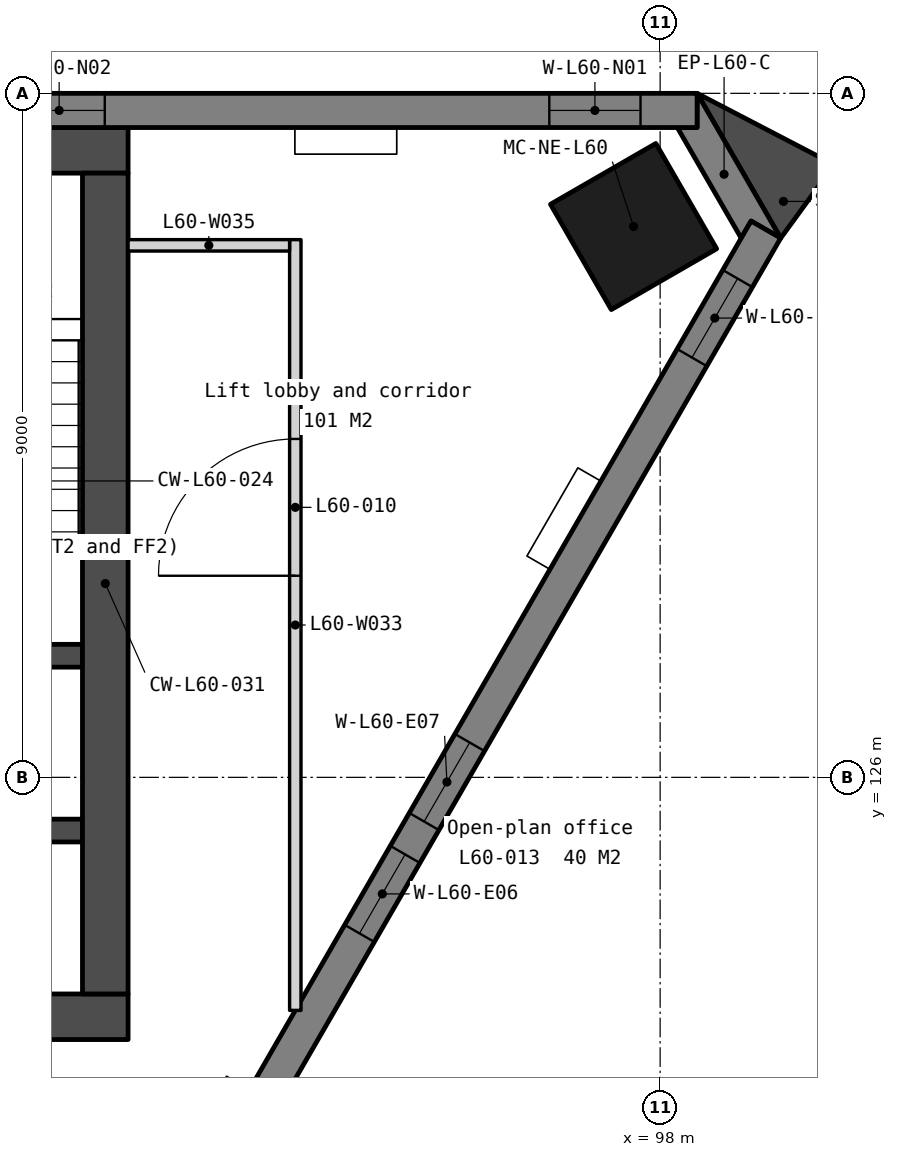
"""IFC4 building model, lengths in metres.
Left out: names, types, materials, properties, quantities, classifications, styles, units other than length and angle.
Written with IfcOpenShell. Run it as: python <this file> out.ifc"""

import sys

from ifc_helpers import new_model, si_unit, direction, frame, frame_2d, origin, origin_2d, place, context, subcontext, project, spatial, polyline, rectangle, outline, extrude, element, fill, save


model = new_model("IFC4")
c1 = context("Model", 3, precision=1e-05, world=origin(), true_north=direction((0.0, 1.0)))
c2 = subcontext(c1, "Body", "Model", "MODEL_VIEW")
j1 = project(units=[si_unit("LENGTHUNIT", "METRE"), si_unit("PLANEANGLEUNIT", "RADIAN")], contexts=[c1])
p1 = place(None, origin())
s1 = spatial("IfcSite", under=j1, at=p1, CompositionType="ELEMENT")
p2 = place(p1, origin())
s2 = spatial("IfcBuilding", under=s1, at=p2, CompositionType="ELEMENT")
p3 = place(p2, frame((0.0, 0.0, 246.5)))
s3 = spatial("IfcBuildingStorey", under=s2, at=p3, CompositionType="ELEMENT", Elevation=246.5)
p4 = place(p3, frame((97.651, 133.247, 0.0), z_axis=(0.0, 0.0, 1.0), x_axis=(-0.5, 0.866025403784, 0.0)))
e1 = element("IfcColumn", 1, at=p4, inside=s3, PredefinedType="COLUMN", context=c2, shape_type="SweptSolid", body=[
    extrude(rectangle(XDim=1.6, YDim=1.6, at=origin_2d()), origin(), (0.0, 0.0, 1.0), 3.9),
])
p5 = place(p3, frame((69.0, 134.25, 0.0), z_axis=(0.0, 0.0, 1.0), x_axis=(1.0, 0.0, 0.0)))
e2 = element("IfcWall", 2, at=p5, inside=s3, PredefinedType="SOLIDWALL", context=c2, shape_type="SweptSolid", body=[
    extrude(rectangle(XDim=22.0, YDim=0.6, at=frame_2d((11.0, 0.0))), origin(), (0.0, 0.0, 1.0), 3.75),
])
p6 = place(p3, frame((69.0, 122.85, 0.0), z_axis=(0.0, 0.0, 1.0), x_axis=(1.0, 0.0, 0.0)))
e3 = element("IfcWall", 3, at=p6, inside=s3, PredefinedType="SOLIDWALL", context=c2, shape_type="SweptSolid", body=[
    extrude(rectangle(XDim=22.0, YDim=0.6, at=frame_2d((11.0, 0.0))), origin(), (0.0, 0.0, 1.0), 3.75),
])
p7 = place(p6, frame((16.375, 0.0, 0.0)))
e4 = element("IfcOpeningElement", 4, at=p7, cuts=e3, PredefinedType="OPENING", context=c2, shape_type="SweptSolid", body=[
    extrude(rectangle(XDim=1.8, YDim=2.1, at=frame_2d((0.9, 1.05))), frame((0.0, 0.31, 0.0), z_axis=(0.0, -1.0, 0.0), x_axis=(1.0, 0.0, 0.0)), (0.0, 0.0, 1.0), 0.62),
])
p8 = place(p6, frame((3.825, 0.0, 0.0)))
e5 = element("IfcOpeningElement", 5, at=p8, cuts=e3, PredefinedType="OPENING", context=c2, shape_type="SweptSolid", body=[
    extrude(rectangle(XDim=1.8, YDim=2.1, at=frame_2d((0.9, 1.05))), frame((0.0, 0.31, 0.0), z_axis=(0.0, -1.0, 0.0), x_axis=(1.0, 0.0, 0.0)), (0.0, 0.0, 1.0), 0.62),
])
p9 = place(p6, frame((12.85, 0.0, 0.0)))
e6 = element("IfcOpeningElement", 6, at=p9, cuts=e3, PredefinedType="OPENING", context=c2, shape_type="SweptSolid", body=[
    extrude(rectangle(XDim=1.5, YDim=2.1, at=frame_2d((0.75, 1.05))), frame((0.0, 0.31, 0.0), z_axis=(0.0, -1.0, 0.0), x_axis=(1.0, 0.0, 0.0)), (0.0, 0.0, 1.0), 0.62),
])
for number, where, z_axis, x_axis in (
    (7, (87.85, 127.6, 0.0), (0.0, 0.0, 1.0), (1.0, 0.0, 0.0)),
    (8, (87.85, 125.3, 0.0), (0.0, 0.0, 1.0), (1.0, 0.0, 0.0)),
):
    element("IfcWall", number, at=place(p3, frame(where, z_axis=z_axis, x_axis=x_axis)), inside=s3, PredefinedType="SOLIDWALL", context=c2, shape_type="SweptSolid", body=[
        extrude(rectangle(XDim=2.55, YDim=0.3, at=frame_2d((1.275, 0.0))), origin(), (0.0, 0.0, 1.0), 3.75),
    ])
p10 = place(p3, frame((90.7, 133.95, 0.0), z_axis=(0.0, 0.0, 1.0), x_axis=(0.0, -1.0, 0.0)))
e9 = element("IfcWall", 9, at=p10, inside=s3, PredefinedType="SOLIDWALL", context=c2, shape_type="SweptSolid", body=[
    extrude(rectangle(XDim=10.8, YDim=0.6, at=frame_2d((5.4, 0.0))), origin(), (0.0, 0.0, 1.0), 3.75),
])
p11 = place(p3, frame((0.0, 0.0, -0.15)))
e10 = element("IfcWall", 10, at=p11, inside=s3, PredefinedType="SOLIDWALL", context=c2, shape_type="SweptSolid", body=[
    extrude(outline(polyline([(99.586, 133.095), (99.197, 133.32), (99.067, 133.095), (98.226, 134.55), (98.486, 134.55), (98.486, 135.0), (99.586, 133.095)])), origin(), (0.0, 0.0, 1.0), 3.9),
])
p12 = place(p3, frame((98.486, 134.775, -0.15), z_axis=(0.0, 0.0, 1.0), x_axis=(-1.0, 0.0, 0.0)))
e11 = element("IfcWall", 11, at=p12, inside=s3, PredefinedType="SOLIDWALL", context=c2, shape_type="SweptSolid", body=[
    extrude(outline(polyline([(36.972, 0.0), (36.972, 3.9), (0.0, 3.9), (0.0, 0.0), (36.972, 0.0)])), frame((0.0, 0.225, 0.0), z_axis=(0.0, -1.0, 0.0), x_axis=(1.0, 0.0, 0.0)), (0.0, 0.0, 1.0), 0.45),
])
p13 = place(p12, frame((0.744, 0.0, 0.95)))
e12 = element("IfcOpeningElement", 12, at=p13, cuts=e11, PredefinedType="OPENING", context=c2, shape_type="SweptSolid", body=[
    extrude(rectangle(XDim=1.2, YDim=2.2, at=frame_2d((0.6, 1.1))), frame((0.0, 0.235, 0.0), z_axis=(0.0, -1.0, 0.0), x_axis=(1.0, 0.0, 0.0)), (0.0, 0.0, 1.0), 0.47),
])
p14 = place(p12, frame((7.793, 0.0, 0.95)))
e13 = element("IfcOpeningElement", 13, at=p14, cuts=e11, PredefinedType="OPENING", context=c2, shape_type="SweptSolid", body=[
    extrude(rectangle(XDim=1.2, YDim=2.2, at=frame_2d((0.6, 1.1))), frame((0.0, 0.235, 0.0), z_axis=(0.0, -1.0, 0.0), x_axis=(1.0, 0.0, 0.0)), (0.0, 0.0, 1.0), 0.47),
])
p15 = place(p12, frame((9.493, 0.0, 0.95)))
e14 = element("IfcOpeningElement", 14, at=p15, cuts=e11, PredefinedType="OPENING", context=c2, shape_type="SweptSolid", body=[
    extrude(rectangle(XDim=1.2, YDim=2.2, at=frame_2d((0.6, 1.1))), frame((0.0, 0.235, 0.0), z_axis=(0.0, -1.0, 0.0), x_axis=(1.0, 0.0, 0.0)), (0.0, 0.0, 1.0), 0.47),
])
p16 = place(p12, frame((17.036, 0.0, 0.95)))
e15 = element("IfcOpeningElement", 15, at=p16, cuts=e11, PredefinedType="OPENING", context=c2, shape_type="SweptSolid", body=[
    extrude(rectangle(XDim=1.2, YDim=2.2, at=frame_2d((0.6, 1.1))), frame((0.0, 0.235, 0.0), z_axis=(0.0, -1.0, 0.0), x_axis=(1.0, 0.0, 0.0)), (0.0, 0.0, 1.0), 0.47),
])
p17 = place(p12, frame((18.736, 0.0, 0.95)))
e16 = element("IfcOpeningElement", 16, at=p17, cuts=e11, PredefinedType="OPENING", context=c2, shape_type="SweptSolid", body=[
    extrude(rectangle(XDim=1.2, YDim=2.2, at=frame_2d((0.6, 1.1))), frame((0.0, 0.235, 0.0), z_axis=(0.0, -1.0, 0.0), x_axis=(1.0, 0.0, 0.0)), (0.0, 0.0, 1.0), 0.47),
])
p18 = place(p12, frame((26.279, 0.0, 0.95)))
e17 = element("IfcOpeningElement", 17, at=p18, cuts=e11, PredefinedType="OPENING", context=c2, shape_type="SweptSolid", body=[
    extrude(rectangle(XDim=1.2, YDim=2.2, at=frame_2d((0.6, 1.1))), frame((0.0, 0.235, 0.0), z_axis=(0.0, -1.0, 0.0), x_axis=(1.0, 0.0, 0.0)), (0.0, 0.0, 1.0), 0.47),
])
p19 = place(p12, frame((27.979, 0.0, 0.95)))
e18 = element("IfcOpeningElement", 18, at=p19, cuts=e11, PredefinedType="OPENING", context=c2, shape_type="SweptSolid", body=[
    extrude(rectangle(XDim=1.2, YDim=2.2, at=frame_2d((0.6, 1.1))), frame((0.0, 0.235, 0.0), z_axis=(0.0, -1.0, 0.0), x_axis=(1.0, 0.0, 0.0)), (0.0, 0.0, 1.0), 0.47),
])
p20 = place(p12, frame((35.028, 0.0, 0.95)))
e19 = element("IfcOpeningElement", 19, at=p20, cuts=e11, PredefinedType="OPENING", context=c2, shape_type="SweptSolid", body=[
    extrude(rectangle(XDim=1.2, YDim=2.2, at=frame_2d((0.6, 1.1))), frame((0.0, 0.235, 0.0), z_axis=(0.0, -1.0, 0.0), x_axis=(1.0, 0.0, 0.0)), (0.0, 0.0, 1.0), 0.47),
])
p21 = place(p3, frame((80.905, 101.188, -0.15), z_axis=(0.0, 0.0, 1.0), x_axis=(0.500002536638, 0.866023939251, 0.0)))
e20 = element("IfcWall", 20, at=p21, inside=s3, PredefinedType="SOLIDWALL", context=c2, shape_type="SweptSolid", body=[
    extrude(outline(polyline([(36.972, 0.0), (36.972, 3.9), (0.0, 3.9), (0.0, 0.0), (36.972, 0.0)])), frame((0.0, 0.225, 0.0), z_axis=(0.0, -1.0, 0.0), x_axis=(1.0, 0.0, 0.0)), (0.0, 0.0, 1.0), 0.45),
])
p22 = place(p21, frame((0.744, 0.0, 0.95)))
e21 = element("IfcOpeningElement", 21, at=p22, cuts=e20, PredefinedType="OPENING", context=c2, shape_type="SweptSolid", body=[
    extrude(rectangle(XDim=1.2, YDim=2.2, at=frame_2d((0.6, 1.1))), frame((0.0, 0.235, 0.0), z_axis=(0.0, -1.0, 0.0), x_axis=(1.0, 0.0, 0.0)), (0.0, 0.0, 1.0), 0.47),
])
p23 = place(p21, frame((7.793, 0.0, 0.95)))
e22 = element("IfcOpeningElement", 22, at=p23, cuts=e20, PredefinedType="OPENING", context=c2, shape_type="SweptSolid", body=[
    extrude(rectangle(XDim=1.2, YDim=2.2, at=frame_2d((0.6, 1.1))), frame((0.0, 0.235, 0.0), z_axis=(0.0, -1.0, 0.0), x_axis=(1.0, 0.0, 0.0)), (0.0, 0.0, 1.0), 0.47),
])
p24 = place(p21, frame((9.493, 0.0, 0.95)))
e23 = element("IfcOpeningElement", 23, at=p24, cuts=e20, PredefinedType="OPENING", context=c2, shape_type="SweptSolid", body=[
    extrude(rectangle(XDim=1.2, YDim=2.2, at=frame_2d((0.6, 1.1))), frame((0.0, 0.235, 0.0), z_axis=(0.0, -1.0, 0.0), x_axis=(1.0, 0.0, 0.0)), (0.0, 0.0, 1.0), 0.47),
])
p25 = place(p21, frame((17.036, 0.0, 0.95)))
e24 = element("IfcOpeningElement", 24, at=p25, cuts=e20, PredefinedType="OPENING", context=c2, shape_type="SweptSolid", body=[
    extrude(rectangle(XDim=1.2, YDim=2.2, at=frame_2d((0.6, 1.1))), frame((0.0, 0.235, 0.0), z_axis=(0.0, -1.0, 0.0), x_axis=(1.0, 0.0, 0.0)), (0.0, 0.0, 1.0), 0.47),
])
p26 = place(p21, frame((18.736, 0.0, 0.95)))
e25 = element("IfcOpeningElement", 25, at=p26, cuts=e20, PredefinedType="OPENING", context=c2, shape_type="SweptSolid", body=[
    extrude(rectangle(XDim=1.2, YDim=2.2, at=frame_2d((0.6, 1.1))), frame((0.0, 0.235, 0.0), z_axis=(0.0, -1.0, 0.0), x_axis=(1.0, 0.0, 0.0)), (0.0, 0.0, 1.0), 0.47),
])
p27 = place(p21, frame((26.279, 0.0, 0.95)))
e26 = element("IfcOpeningElement", 26, at=p27, cuts=e20, PredefinedType="OPENING", context=c2, shape_type="SweptSolid", body=[
    extrude(rectangle(XDim=1.2, YDim=2.2, at=frame_2d((0.6, 1.1))), frame((0.0, 0.235, 0.0), z_axis=(0.0, -1.0, 0.0), x_axis=(1.0, 0.0, 0.0)), (0.0, 0.0, 1.0), 0.47),
])
p28 = place(p21, frame((27.979, 0.0, 0.95)))
e27 = element("IfcOpeningElement", 27, at=p28, cuts=e20, PredefinedType="OPENING", context=c2, shape_type="SweptSolid", body=[
    extrude(rectangle(XDim=1.2, YDim=2.2, at=frame_2d((0.6, 1.1))), frame((0.0, 0.235, 0.0), z_axis=(0.0, -1.0, 0.0), x_axis=(1.0, 0.0, 0.0)), (0.0, 0.0, 1.0), 0.47),
])
p29 = place(p21, frame((35.028, 0.0, 0.95)))
e28 = element("IfcOpeningElement", 28, at=p29, cuts=e20, PredefinedType="OPENING", context=c2, shape_type="SweptSolid", body=[
    extrude(rectangle(XDim=1.2, YDim=2.2, at=frame_2d((0.6, 1.1))), frame((0.0, 0.235, 0.0), z_axis=(0.0, -1.0, 0.0), x_axis=(1.0, 0.0, 0.0)), (0.0, 0.0, 1.0), 0.47),
])
p30 = place(p3, frame((0.0, 0.0, -0.15)))
e29 = element("IfcWall", 29, at=p30, inside=s3, PredefinedType="SOLIDWALL", context=c2, shape_type="SweptSolid", body=[
    extrude(outline(polyline([(99.586, 133.095), (100.29, 134.061), (98.486, 135.0), (99.586, 133.095)])), origin(), (0.0, 0.0, 1.0), 3.9),
])
p31 = place(p3, frame((93.2, 122.934, 0.0), z_axis=(0.0, 0.0, 1.0), x_axis=(0.0, 1.0, 0.0)))
e30 = element("IfcWall", 30, at=p31, inside=s3, PredefinedType="PARTITIONING", context=c2, shape_type="SweptSolid", body=[
    extrude(rectangle(XDim=10.141, YDim=0.15, at=frame_2d((5.071, 0.0))), origin(), (0.0, 0.0, 1.0), 3.75),
])
p32 = place(p31, frame((5.719, 0.0, 0.0)))
e31 = element("IfcOpeningElement", 31, at=p32, cuts=e30, PredefinedType="OPENING", context=c2, shape_type="SweptSolid", body=[
    extrude(rectangle(XDim=1.8, YDim=2.1, at=frame_2d((0.9, 1.05))), frame((0.0, 0.085, 0.0), z_axis=(0.0, -1.0, 0.0), x_axis=(1.0, 0.0, 0.0)), (0.0, 0.0, 1.0), 0.17),
])
p33 = place(p3, frame((91.0, 133.0, 0.0), z_axis=(0.0, 0.0, 1.0), x_axis=(1.0, 0.0, 0.0)))
e32 = element("IfcWall", 32, at=p33, inside=s3, PredefinedType="PARTITIONING", context=c2, shape_type="SweptSolid", body=[
    extrude(rectangle(XDim=2.125, YDim=0.15, at=frame_2d((1.062, 0.0))), origin(), (0.0, 0.0, 1.0), 3.75),
])
p34 = place(p13, origin())
e33 = element("IfcWindow", 33, at=p34, inside=s3, PartitioningType="SINGLE_PANEL", PredefinedType="WINDOW", context=c2, shape_type="SweptSolid", body=[
    extrude(rectangle(XDim=1.2, YDim=2.2, at=frame_2d((0.6, 1.1))), frame((0.0, 0.03, 0.0), z_axis=(0.0, -1.0, 0.0), x_axis=(1.0, 0.0, 0.0)), (0.0, 0.0, 1.0), 0.06),
])
fill(e12, e33)
p35 = place(p14, origin())
e34 = element("IfcWindow", 34, at=p35, inside=s3, PartitioningType="SINGLE_PANEL", PredefinedType="WINDOW", context=c2, shape_type="SweptSolid", body=[
    extrude(rectangle(XDim=1.2, YDim=2.2, at=frame_2d((0.6, 1.1))), frame((0.0, 0.03, 0.0), z_axis=(0.0, -1.0, 0.0), x_axis=(1.0, 0.0, 0.0)), (0.0, 0.0, 1.0), 0.06),
])
fill(e13, e34)
p36 = place(p27, origin())
e35 = element("IfcWindow", 35, at=p36, inside=s3, PartitioningType="SINGLE_PANEL", PredefinedType="WINDOW", context=c2, shape_type="SweptSolid", body=[
    extrude(rectangle(XDim=1.2, YDim=2.2, at=frame_2d((0.6, 1.1))), frame((0.0, 0.03, 0.0), z_axis=(0.0, -1.0, 0.0), x_axis=(1.0, 0.0, 0.0)), (0.0, 0.0, 1.0), 0.06),
])
fill(e26, e35)
p37 = place(p28, origin())
e36 = element("IfcWindow", 36, at=p37, inside=s3, PartitioningType="SINGLE_PANEL", PredefinedType="WINDOW", context=c2, shape_type="SweptSolid", body=[
    extrude(rectangle(XDim=1.2, YDim=2.2, at=frame_2d((0.6, 1.1))), frame((0.0, 0.03, 0.0), z_axis=(0.0, -1.0, 0.0), x_axis=(1.0, 0.0, 0.0)), (0.0, 0.0, 1.0), 0.06),
])
fill(e27, e36)
p38 = place(p29, origin())
e37 = element("IfcWindow", 37, at=p38, inside=s3, PartitioningType="SINGLE_PANEL", PredefinedType="WINDOW", context=c2, shape_type="SweptSolid", body=[
    extrude(rectangle(XDim=1.2, YDim=2.2, at=frame_2d((0.6, 1.1))), frame((0.0, 0.03, 0.0), z_axis=(0.0, -1.0, 0.0), x_axis=(1.0, 0.0, 0.0)), (0.0, 0.0, 1.0), 0.06),
])
fill(e28, e37)
p39 = place(p32, origin())
e38 = element("IfcDoor", 38, at=p39, inside=s3, OperationType="SINGLE_SWING_LEFT", PredefinedType="DOOR", context=c2, shape_type="SweptSolid", body=[
    extrude(rectangle(XDim=1.8, YDim=2.1, at=frame_2d((0.9, 1.05))), frame((0.0, 0.025, 0.0), z_axis=(0.0, -1.0, 0.0), x_axis=(1.0, 0.0, 0.0)), (0.0, 0.0, 1.0), 0.05),
])
fill(e31, e38)
save(model, sys.argv[1])
